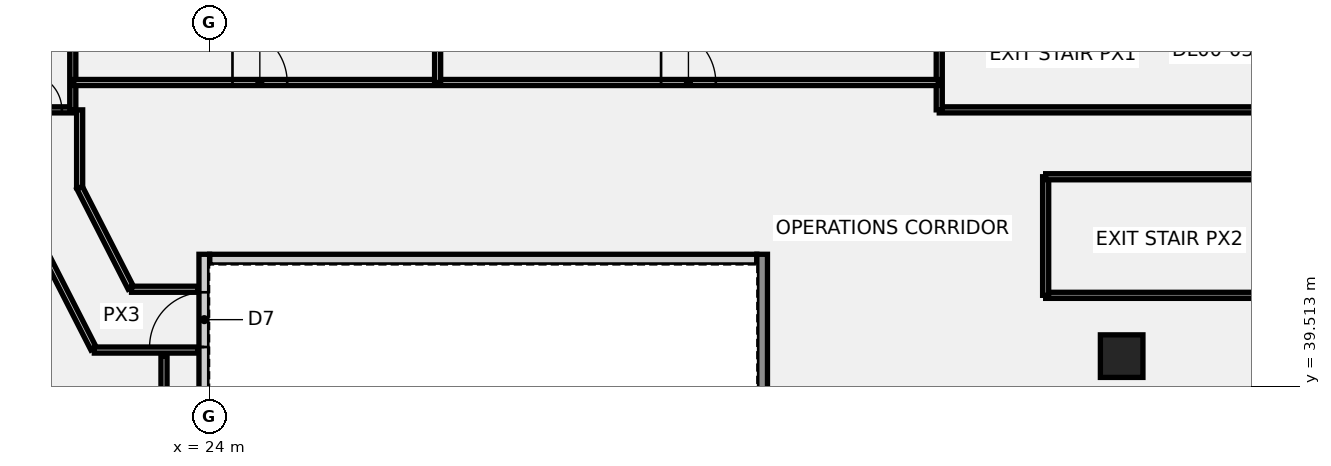
"""IFC4 building model, lengths in metres.
Left out: names, types, materials, properties, quantities, classifications, styles, units other than length and angle.
Written with IfcOpenShell. Run it as: python <this file> out.ifc"""

import sys

from ifc_helpers import new_model, si_unit, direction, frame, frame_2d, origin, origin_2d, place, context, subcontext, project, spatial, rectangle, extrude, element, fill, save


model = new_model("IFC4")
c1 = context("Model", 3, precision=1e-05, world=origin(), true_north=direction((0.0, 1.0)))
c2 = subcontext(c1, "Body", "Model", "MODEL_VIEW")
j1 = project(units=[si_unit("LENGTHUNIT", "METRE"), si_unit("PLANEANGLEUNIT", "RADIAN")], contexts=[c1])
p1 = place(None, origin())
s1 = spatial("IfcSite", under=j1, at=p1, CompositionType="ELEMENT")
p2 = place(p1, origin())
s2 = spatial("IfcBuilding", under=s1, at=p2, CompositionType="ELEMENT")
p3 = place(p2, origin())
s3 = spatial("IfcBuildingStorey", under=s2, at=p3, CompositionType="ELEMENT", Elevation=0.0)
p4 = place(p3, frame((54.0, 40.5, -0.55), z_axis=(0.0, 0.0, 1.0), x_axis=(1.0, 0.0, 0.0)))
e1 = element("IfcColumn", 1, at=p4, inside=s3, PredefinedType="COLUMN", context=c2, shape_type="SweptSolid", body=[
    extrude(rectangle(XDim=1.4, YDim=1.4, at=origin_2d()), origin(), (0.0, 0.0, 1.0), 9.05),
])
p5 = place(p3, frame((8.0, 48.6, 0.0), z_axis=(0.0, 0.0, 1.0), x_axis=(1.0, 0.0, 0.0)))
e2 = element("IfcWall", 2, at=p5, inside=s3, PredefinedType="PARTITIONING", context=c2, shape_type="SweptSolid", body=[
    extrude(rectangle(XDim=11.5, YDim=0.2, at=frame_2d((5.75, 0.0))), origin(), (0.0, 0.0, 1.0), 8.5),
])
p6 = place(p5, frame((9.94, 0.0, 0.0)))
e3 = element("IfcOpeningElement", 3, at=p6, cuts=e2, PredefinedType="OPENING", context=c2, shape_type="SweptSolid", body=[
    extrude(rectangle(XDim=1.2, YDim=2.1, at=frame_2d((0.6, 1.05))), frame((0.0, 0.11, 0.0), z_axis=(0.0, -1.0, 0.0), x_axis=(1.0, 0.0, 0.0)), (0.0, 0.0, 1.0), 0.22),
])
p7 = place(p3, frame((19.5, 48.6, 0.0), z_axis=(0.0, 0.0, 1.0), x_axis=(0.0, 1.0, 0.0)))
e4 = element("IfcWall", 4, at=p7, inside=s3, PredefinedType="PARTITIONING", context=c2, shape_type="SweptSolid", body=[
    extrude(rectangle(XDim=3.9, YDim=0.2, at=frame_2d((1.95, 0.0))), origin(), (0.0, 0.0, 1.0), 8.5),
])
p8 = place(p3, frame((48.0, 48.6, 0.0), z_axis=(0.0, 0.0, 1.0), x_axis=(1.0, 0.0, 0.0)))
e5 = element("IfcWall", 5, at=p8, inside=s3, PredefinedType="PARTITIONING", context=c2, shape_type="SweptSolid", body=[
    extrude(rectangle(XDim=11.5, YDim=0.2, at=frame_2d((5.75, 0.0))), origin(), (0.0, 0.0, 1.0), 8.5),
])
p9 = place(p3, frame((48.0, 48.6, 0.0), z_axis=(0.0, 0.0, 1.0), x_axis=(0.0, 1.0, 0.0)))
e6 = element("IfcWall", 6, at=p9, inside=s3, PredefinedType="PARTITIONING", context=c2, shape_type="SweptSolid", body=[
    extrude(rectangle(XDim=3.9, YDim=0.2, at=frame_2d((1.95, 0.0))), origin(), (0.0, 0.0, 1.0), 8.5),
])
p10 = place(p3, frame((51.5, 42.5, 0.0), z_axis=(0.0, 0.0, 1.0), x_axis=(1.0, 0.0, 0.0)))
e7 = element("IfcWall", 7, at=p10, inside=s3, PredefinedType="PARTITIONING", context=c2, shape_type="SweptSolid", body=[
    extrude(rectangle(XDim=11.5, YDim=0.2, at=frame_2d((5.75, 0.0))), origin(), (0.0, 0.0, 1.0), 8.5),
])
p11 = place(p3, frame((51.5, 42.5, 0.0), z_axis=(0.0, 0.0, 1.0), x_axis=(0.0, 1.0, 0.0)))
e8 = element("IfcWall", 8, at=p11, inside=s3, PredefinedType="PARTITIONING", context=c2, shape_type="SweptSolid", body=[
    extrude(rectangle(XDim=3.9, YDim=0.2, at=frame_2d((1.95, 0.0))), origin(), (0.0, 0.0, 1.0), 8.5),
])
p12 = place(p3, frame((51.5, 46.4, 0.0), z_axis=(0.0, 0.0, 1.0), x_axis=(1.0, 0.0, 0.0)))
e9 = element("IfcWall", 9, at=p12, inside=s3, PredefinedType="PARTITIONING", context=c2, shape_type="SweptSolid", body=[
    extrude(rectangle(XDim=11.5, YDim=0.2, at=frame_2d((5.75, 0.0))), origin(), (0.0, 0.0, 1.0), 8.5),
])
p13 = place(p3, frame((19.53, 49.5, 0.0), z_axis=(0.0, 0.0, 1.0), x_axis=(1.0, 0.0, 0.0)))
e10 = element("IfcWall", 10, at=p13, inside=s3, PredefinedType="PARTITIONING", context=c2, shape_type="SweptSolid", body=[
    extrude(rectangle(XDim=28.44, YDim=0.2, at=frame_2d((14.22, 0.0))), origin(), (0.0, 0.0, 1.0), 8.5),
])
p14 = place(p13, frame((5.222, 0.0, 0.0)))
e11 = element("IfcOpeningElement", 11, at=p14, cuts=e10, PredefinedType="OPENING", context=c2, shape_type="SweptSolid", body=[
    extrude(rectangle(XDim=1.8, YDim=2.1, at=frame_2d((0.9, 1.05))), frame((0.0, 0.11, 0.0), z_axis=(0.0, -1.0, 0.0), x_axis=(1.0, 0.0, 0.0)), (0.0, 0.0, 1.0), 0.22),
])
p15 = place(p13, frame((19.32, 0.0, 0.0)))
e12 = element("IfcOpeningElement", 12, at=p15, cuts=e10, PredefinedType="OPENING", context=c2, shape_type="SweptSolid", body=[
    extrude(rectangle(XDim=1.8, YDim=2.1, at=frame_2d((0.9, 1.05))), frame((0.0, 0.11, 0.0), z_axis=(0.0, -1.0, 0.0), x_axis=(1.0, 0.0, 0.0)), (0.0, 0.0, 1.0), 0.22),
])
p16 = place(p3, frame((31.5, 49.5, 0.0), z_axis=(0.0, 0.0, 1.0), x_axis=(0.0, 1.0, 0.0)))
e13 = element("IfcWall", 13, at=p16, inside=s3, PredefinedType="PARTITIONING", context=c2, shape_type="SweptSolid", body=[
    extrude(rectangle(XDim=10.199, YDim=0.2, at=frame_2d((5.1, 0.0))), origin(), (0.0, 0.0, 1.0), 8.5),
])
p17 = place(p3, frame((22.5, 22.245, 0.0), z_axis=(0.0, 0.0, 1.0), x_axis=(0.0, 1.0, 0.0)))
e14 = element("IfcWall", 14, at=p17, inside=s3, PredefinedType="PARTITIONING", context=c2, shape_type="SweptSolid", body=[
    extrude(rectangle(XDim=18.255, YDim=0.2, at=frame_2d((9.127, 0.0))), origin(), (0.0, 0.0, 1.0), 8.5),
])
p18 = place(p3, frame((19.725, 48.6, 0.0), z_axis=(0.0, 0.0, 1.0), x_axis=(0.0, -1.0, 0.0)))
e15 = element("IfcWall", 15, at=p18, inside=s3, PredefinedType="PARTITIONING", context=c2, shape_type="SweptSolid", body=[
    extrude(rectangle(XDim=2.559, YDim=0.2, at=frame_2d((1.28, 0.0))), origin(), (0.0, 0.0, 1.0), 8.5),
])
p19 = place(p3, frame((19.725, 46.041, 0.0), z_axis=(0.0, 0.0, 1.0), x_axis=(0.454953010124, -0.890515445447, 0.0)))
e16 = element("IfcWall", 16, at=p19, inside=s3, PredefinedType="PARTITIONING", context=c2, shape_type="SweptSolid", body=[
    extrude(rectangle(XDim=3.702, YDim=0.2, at=frame_2d((1.851, 0.0))), origin(), (0.0, 0.0, 1.0), 8.5),
])
p20 = place(p3, frame((21.432, 42.7, 0.0), z_axis=(0.0, 0.0, 1.0), x_axis=(1.0, 0.0, 0.0)))
e17 = element("IfcWall", 17, at=p20, inside=s3, PredefinedType="PARTITIONING", context=c2, shape_type="SweptSolid", body=[
    extrude(rectangle(XDim=2.188, YDim=0.2, at=frame_2d((1.094, 0.0))), origin(), (0.0, 0.0, 1.0), 8.5),
])
p21 = place(p3, frame((17.725, 45.559, 0.0), z_axis=(0.0, 0.0, 1.0), x_axis=(0.454998882798, -0.890492008191, 0.0)))
e18 = element("IfcWall", 18, at=p21, inside=s3, PredefinedType="PARTITIONING", context=c2, shape_type="SweptSolid", body=[
    extrude(rectangle(XDim=5.407, YDim=0.2, at=frame_2d((2.704, 0.0))), origin(), (0.0, 0.0, 1.0), 8.5),
])
p22 = place(p3, frame((20.208, 40.7, 0.0), z_axis=(0.0, 0.0, 1.0), x_axis=(1.0, 0.0, 0.0)))
e19 = element("IfcWall", 19, at=p22, inside=s3, PredefinedType="PARTITIONING", context=c2, shape_type="SweptSolid", body=[
    extrude(rectangle(XDim=3.412, YDim=0.2, at=frame_2d((1.706, 0.0))), origin(), (0.0, 0.0, 1.0), 8.5),
])
p23 = place(p3, frame((24.0, 43.675, 0.0), z_axis=(0.0, 0.0, 1.0), x_axis=(1.0, 0.0, 0.0)))
e20 = element("IfcWall", 20, at=p23, inside=s3, PredefinedType="SOLIDWALL", context=c2, shape_type="SweptSolid", body=[
    extrude(rectangle(XDim=18.0, YDim=0.35, at=frame_2d((9.0, 0.0))), origin(), (0.0, 0.0, 1.0), 8.5),
])
p24 = place(p3, frame((23.825, 16.45, 0.0), z_axis=(0.0, 0.0, 1.0), x_axis=(0.0, 1.0, 0.0)))
e21 = element("IfcWall", 21, at=p24, inside=s3, PredefinedType="SOLIDWALL", context=c2, shape_type="SweptSolid", body=[
    extrude(rectangle(XDim=27.4, YDim=0.35, at=frame_2d((13.7, 0.0))), origin(), (0.0, 0.0, 1.0), 8.5),
])
p25 = place(p24, frame((3.35, 0.0, 0.0)))
e22 = element("IfcOpeningElement", 22, at=p25, cuts=e21, PredefinedType="OPENING", context=c2, shape_type="SweptSolid", body=[
    extrude(rectangle(XDim=1.8, YDim=2.4, at=frame_2d((0.9, 1.2))), frame((0.0, 0.185, 0.0), z_axis=(0.0, -1.0, 0.0), x_axis=(1.0, 0.0, 0.0)), (0.0, 0.0, 1.0), 0.37),
])
p26 = place(p24, frame((24.35, 0.0, 0.0)))
e23 = element("IfcOpeningElement", 23, at=p26, cuts=e21, PredefinedType="OPENING", context=c2, shape_type="SweptSolid", body=[
    extrude(rectangle(XDim=1.8, YDim=2.4, at=frame_2d((0.9, 1.2))), frame((0.0, 0.185, 0.0), z_axis=(0.0, -1.0, 0.0), x_axis=(1.0, 0.0, 0.0)), (0.0, 0.0, 1.0), 0.37),
])
p27 = place(p24, frame((14.9, 0.0, 1.0)))
e24 = element("IfcOpeningElement", 24, at=p27, cuts=e21, PredefinedType="OPENING", context=c2, shape_type="SweptSolid", body=[
    extrude(rectangle(XDim=2.4, YDim=1.8, at=frame_2d((1.2, 0.9))), frame((0.0, 0.185, 0.0), z_axis=(0.0, -1.0, 0.0), x_axis=(1.0, 0.0, 0.0)), (0.0, 0.0, 1.0), 0.37),
])
p28 = place(p3, frame((42.175, 38.75, 0.0), z_axis=(0.0, 0.0, 1.0), x_axis=(0.0, 1.0, 0.0)))
e25 = element("IfcWall", 25, at=p28, inside=s3, PredefinedType="SOLIDWALL", context=c2, shape_type="SweptSolid", body=[
    extrude(rectangle(XDim=5.1, YDim=0.35, at=frame_2d((2.55, 0.0))), origin(), (0.0, 0.0, 1.0), 8.5),
])
p29 = place(p6, origin())
e26 = element("IfcDoor", 26, at=p29, inside=s3, OperationType="SINGLE_SWING_LEFT", PredefinedType="DOOR", context=c2, shape_type="SweptSolid", body=[
    extrude(rectangle(XDim=1.2, YDim=2.1, at=frame_2d((0.6, 1.05))), frame((0.0, 0.025, 0.0), z_axis=(0.0, -1.0, 0.0), x_axis=(1.0, 0.0, 0.0)), (0.0, 0.0, 1.0), 0.05),
])
fill(e3, e26)
p30 = place(p14, origin())
e27 = element("IfcDoor", 27, at=p30, inside=s3, OperationType="SINGLE_SWING_RIGHT", PredefinedType="DOOR", context=c2, shape_type="SweptSolid", body=[
    extrude(rectangle(XDim=1.8, YDim=2.1, at=frame_2d((0.9, 1.05))), frame((0.0, 0.025, 0.0), z_axis=(0.0, -1.0, 0.0), x_axis=(1.0, 0.0, 0.0)), (0.0, 0.0, 1.0), 0.05),
])
fill(e11, e27)
p31 = place(p15, origin())
e28 = element("IfcDoor", 28, at=p31, inside=s3, OperationType="SINGLE_SWING_LEFT", PredefinedType="DOOR", context=c2, shape_type="SweptSolid", body=[
    extrude(rectangle(XDim=1.8, YDim=2.1, at=frame_2d((0.9, 1.05))), frame((0.0, 0.025, 0.0), z_axis=(0.0, -1.0, 0.0), x_axis=(1.0, 0.0, 0.0)), (0.0, 0.0, 1.0), 0.05),
])
fill(e12, e28)
p32 = place(p26, frame((1.8, 0.0, 0.0), z_axis=(0.0, 0.0, 1.0), x_axis=(-1.0, 0.0, 0.0)))
e29 = element("IfcDoor", 29, at=p32, inside=s3, OperationType="SINGLE_SWING_LEFT", PredefinedType="DOOR", context=c2, shape_type="SweptSolid", body=[
    extrude(rectangle(XDim=1.8, YDim=2.4, at=frame_2d((0.9, 1.2))), frame((0.0, 0.025, 0.0), z_axis=(0.0, -1.0, 0.0), x_axis=(1.0, 0.0, 0.0)), (0.0, 0.0, 1.0), 0.05),
])
fill(e23, e29)
save(model, sys.argv[1])
